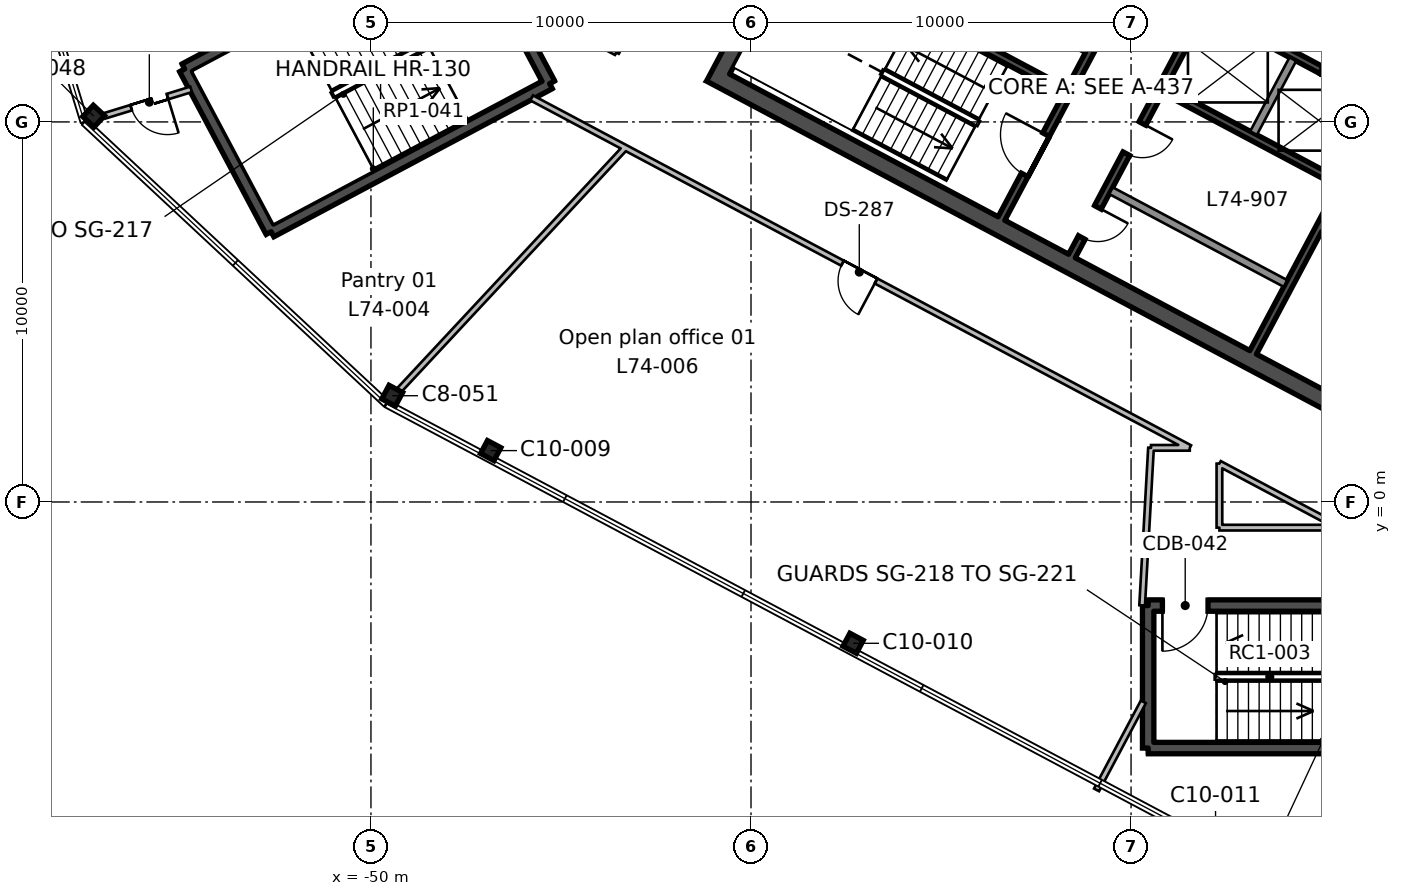
"""IFC4 building model, lengths in metres.
Left out: names, types, materials, properties, quantities, classifications, styles, units other than length and angle.
Written with IfcOpenShell. Run it as: python <this file> out.ifc"""

import sys

from ifc_helpers import new_model, si_unit, direction, frame, frame_2d, origin, origin_2d, place, context, subcontext, project, spatial, rectangle, i_section, extrude, element, fill, save


model = new_model("IFC4")
c1 = context("Model", 3, precision=1e-05, world=origin(), true_north=direction((0.0, 1.0)))
c2 = subcontext(c1, "Body", "Model", "MODEL_VIEW")
j1 = project(units=[si_unit("LENGTHUNIT", "METRE"), si_unit("PLANEANGLEUNIT", "RADIAN")], contexts=[c1])
p1 = place(None, origin())
s1 = spatial("IfcSite", under=j1, at=p1, CompositionType="ELEMENT")
p2 = place(p1, origin())
s2 = spatial("IfcBuilding", under=s1, at=p2, CompositionType="ELEMENT")
p3 = place(p2, frame((0.0, 0.0, 324.3)))
s3 = spatial("IfcBuildingStorey", under=s2, at=p3, CompositionType="ELEMENT", Elevation=324.3)
for number, where, z_axis, x_axis in (
    (1, (-37.313, -3.718, 0.0), (0.0, 0.0, 1.0), (0.883, -0.469, 0.0)),
    (2, (-46.849, 1.352, 0.0), (0.0, 0.0, 1.0), (0.883, -0.469, 0.0)),
):
    element("IfcColumn", number, at=place(p3, frame(where, z_axis=z_axis, x_axis=x_axis)), inside=s3, PredefinedType="COLUMN", context=c2, shape_type="SweptSolid", body=[
        extrude(i_section(OverallWidth=0.399, OverallDepth=0.386, WebThickness=0.021, FlangeThickness=0.033, FilletRadius=0.015, at=origin_2d()), origin(), (0.0, 0.0, 1.0), 3.9),
    ])
for number, where, z_axis, x_axis in (
    (3, (-49.441, 2.796, 0.0), (0.0, 0.0, 1.0), (0.883, -0.469, 0.0)),
    (4, (-57.296, 10.152, 0.0), (0.0, 0.0, 1.0), (0.731, -0.682, 0.0)),
):
    element("IfcColumn", number, at=place(p3, frame(where, z_axis=z_axis, x_axis=x_axis)), inside=s3, PredefinedType="COLUMN", context=c2, shape_type="SweptSolid", body=[
        extrude(i_section(OverallWidth=0.404, OverallDepth=0.406, WebThickness=0.027, FlangeThickness=0.044, FilletRadius=0.015, at=origin_2d()), origin(), (0.0, 0.0, 1.0), 3.9),
    ])
p4 = place(p3, frame((-32.004, 27.833, 0.0), z_axis=(0.0, 0.0, 1.0), x_axis=(-0.469467968382, -0.882949504028, 0.0)))
e5 = element("IfcWall", 5, at=p4, inside=s3, PredefinedType="SHEAR", context=c2, shape_type="SweptSolid", body=[
    extrude(rectangle(XDim=19.1, YDim=0.45, at=frame_2d((9.55, 0.0))), origin(), (0.0, 0.0, 1.0), 3.9),
])
p5 = place(p4, frame((10.15, 0.0, 0.0)))
e6 = element("IfcOpeningElement", 6, at=p5, cuts=e5, PredefinedType="OPENING", context=c2, shape_type="SweptSolid", body=[
    extrude(rectangle(XDim=2.4, YDim=2.4, at=frame_2d((1.2, 1.2))), frame((0.0, 0.235, 0.0), z_axis=(0.0, -1.0, 0.0), x_axis=(1.0, 0.0, 0.0)), (0.0, 0.0, 1.0), 0.47),
])
p6 = place(p3, frame((-22.832, 1.578, 0.0), z_axis=(0.0, 0.0, 1.0), x_axis=(-0.88294509198, 0.469476266226, 0.0)))
e7 = element("IfcWall", 7, at=p6, inside=s3, PredefinedType="SHEAR", context=c2, shape_type="SweptSolid", body=[
    extrude(rectangle(XDim=20.2, YDim=0.45, at=frame_2d((10.1, 0.0))), origin(), (0.0, 0.0, 1.0), 3.9),
])
p7 = place(p3, frame((-23.36, 10.382, 0.0), z_axis=(0.0, 0.0, 1.0), x_axis=(-0.469480409012, -0.88294288918, 0.0)))
e8 = element("IfcWall", 8, at=p7, inside=s3, PredefinedType="SHEAR", context=c2, shape_type="SweptSolid", body=[
    extrude(rectangle(XDim=7.3, YDim=0.2, at=frame_2d((3.65, 0.0))), origin(), (0.0, 0.0, 1.0), 3.9),
])
p8 = place(p3, frame((-25.744, 11.65, 0.0), z_axis=(0.0, 0.0, 1.0), x_axis=(-0.469487830541, -0.882938942948, 0.0)))
e9 = element("IfcWall", 9, at=p8, inside=s3, PredefinedType="SOLIDWALL", context=c2, shape_type="SweptSolid", body=[
    extrude(rectangle(XDim=2.2, YDim=0.2, at=frame_2d((1.1, 0.0))), origin(), (0.0, 0.0, 1.0), 3.9),
])
p9 = place(p3, frame((-28.128, 12.917, 0.0), z_axis=(0.0, 0.0, 1.0), x_axis=(-0.469454336211, -0.882956752176, 0.0)))
e10 = element("IfcWall", 10, at=p9, inside=s3, PredefinedType="SHEAR", context=c2, shape_type="SweptSolid", body=[
    extrude(rectangle(XDim=7.3, YDim=0.2, at=frame_2d((3.65, 0.0))), origin(), (0.0, 0.0, 1.0), 3.9),
])
p10 = place(p9, frame((3.35, 0.0, 0.0)))
e11 = element("IfcOpeningElement", 11, at=p10, cuts=e10, PredefinedType="OPENING", context=c2, shape_type="SweptSolid", body=[
    extrude(rectangle(XDim=0.9, YDim=2.1, at=frame_2d((0.45, 1.05))), frame((0.0, 0.11, 0.0), z_axis=(0.0, -1.0, 0.0), x_axis=(1.0, 0.0, 0.0)), (0.0, 0.0, 1.0), 0.22),
])
p11 = place(p9, frame((5.85, 0.0, 0.0)))
e12 = element("IfcOpeningElement", 12, at=p11, cuts=e10, PredefinedType="OPENING", context=c2, shape_type="SweptSolid", body=[
    extrude(rectangle(XDim=0.9, YDim=2.1, at=frame_2d((0.45, 1.05))), frame((0.0, 0.11, 0.0), z_axis=(0.0, -1.0, 0.0), x_axis=(1.0, 0.0, 0.0)), (0.0, 0.0, 1.0), 0.22),
])
p12 = place(p3, frame((-29.982, 13.903, 0.0), z_axis=(0.0, 0.0, 1.0), x_axis=(-0.469454336211, -0.882956752176, 0.0)))
e13 = element("IfcWall", 13, at=p12, inside=s3, PredefinedType="SHEAR", context=c2, shape_type="SweptSolid", body=[
    extrude(rectangle(XDim=7.3, YDim=0.2, at=frame_2d((3.65, 0.0))), origin(), (0.0, 0.0, 1.0), 3.9),
])
p13 = place(p12, frame((4.8, 0.0, 0.0)))
e14 = element("IfcOpeningElement", 14, at=p13, cuts=e13, PredefinedType="OPENING", context=c2, shape_type="SweptSolid", body=[
    extrude(rectangle(XDim=1.2, YDim=2.1, at=frame_2d((0.6, 1.05))), frame((0.0, 0.11, 0.0), z_axis=(0.0, -1.0, 0.0), x_axis=(1.0, 0.0, 0.0)), (0.0, 0.0, 1.0), 0.22),
])
p14 = place(p3, frame((-19.252, 8.311, 0.0), z_axis=(0.0, 0.0, 1.0), x_axis=(-0.882955722218, 0.469456273365, 0.0)))
e15 = element("IfcWall", 15, at=p14, inside=s3, PredefinedType="SHEAR", context=c2, shape_type="SweptSolid", body=[
    extrude(rectangle(XDim=10.0, YDim=0.2, at=frame_2d((5.0, 0.0))), origin(), (0.0, 0.0, 1.0), 3.9),
])
p15 = place(p14, frame((2.1, 0.0, 0.0)))
e16 = element("IfcOpeningElement", 16, at=p15, cuts=e15, PredefinedType="OPENING", context=c2, shape_type="SweptSolid", body=[
    extrude(rectangle(XDim=1.2, YDim=2.1, at=frame_2d((0.6, 1.05))), frame((0.0, 0.11, 0.0), z_axis=(0.0, -1.0, 0.0), x_axis=(1.0, 0.0, 0.0)), (0.0, 0.0, 1.0), 0.22),
])
p16 = place(p14, frame((5.4, 0.0, 0.0)))
e17 = element("IfcOpeningElement", 17, at=p16, cuts=e15, PredefinedType="OPENING", context=c2, shape_type="SweptSolid", body=[
    extrude(rectangle(XDim=1.1, YDim=2.1, at=frame_2d((0.55, 1.05))), frame((0.0, 0.11, 0.0), z_axis=(0.0, -1.0, 0.0), x_axis=(1.0, 0.0, 0.0)), (0.0, 0.0, 1.0), 0.22),
])
p17 = place(p14, frame((8.1, 0.0, 0.0)))
e18 = element("IfcOpeningElement", 18, at=p17, cuts=e15, PredefinedType="OPENING", context=c2, shape_type="SweptSolid", body=[
    extrude(rectangle(XDim=1.1, YDim=2.1, at=frame_2d((0.55, 1.05))), frame((0.0, 0.11, 0.0), z_axis=(0.0, -1.0, 0.0), x_axis=(1.0, 0.0, 0.0)), (0.0, 0.0, 1.0), 0.22),
])
p18 = place(p3, frame((-24.528, 8.398, 0.0), z_axis=(0.0, 0.0, 1.0), x_axis=(-0.882953967957, 0.469459572775, 0.0)))
e19 = element("IfcWall", 19, at=p18, inside=s3, PredefinedType="SHEAR", context=c2, shape_type="SweptSolid", body=[
    extrude(rectangle(XDim=5.2, YDim=0.2, at=frame_2d((2.6, 0.0))), origin(), (0.0, 0.0, 1.0), 3.9),
])
p19 = place(p3, frame((-31.15, 11.919, 0.0), z_axis=(0.0, 0.0, 1.0), x_axis=(-0.882940221191, 0.469485426614, 0.0)))
e20 = element("IfcWall", 20, at=p19, inside=s3, PredefinedType="SHEAR", context=c2, shape_type="SweptSolid", body=[
    extrude(rectangle(XDim=8.0, YDim=0.2, at=frame_2d((4.0, 0.0))), origin(), (0.0, 0.0, 1.0), 3.9),
])
p20 = place(p3, frame((-20.965, 5.088, 0.0), z_axis=(0.0, 0.0, 1.0), x_axis=(-0.882925986334, 0.469512196493, 0.0)))
e21 = element("IfcWall", 21, at=p20, inside=s3, PredefinedType="SHEAR", context=c2, shape_type="SweptSolid", body=[
    extrude(rectangle(XDim=4.5, YDim=0.2, at=frame_2d((2.25, 0.0))), origin(), (0.0, 0.0, 1.0), 3.9),
])
p21 = place(p20, frame((0.6, 0.0, 0.0)))
e22 = element("IfcOpeningElement", 22, at=p21, cuts=e21, PredefinedType="OPENING", context=c2, shape_type="SweptSolid", body=[
    extrude(rectangle(XDim=1.1, YDim=2.1, at=frame_2d((0.55, 1.05))), frame((0.0, 0.11, 0.0), z_axis=(0.0, -1.0, 0.0), x_axis=(1.0, 0.0, 0.0)), (0.0, 0.0, 1.0), 0.22),
])
p22 = place(p3, frame((-31.737, 10.816, 0.0), z_axis=(0.0, 0.0, 1.0), x_axis=(-0.882940221191, 0.469485426614, 0.0)))
e23 = element("IfcWall", 23, at=p22, inside=s3, PredefinedType="SHEAR", context=c2, shape_type="SweptSolid", body=[
    extrude(rectangle(XDim=8.0, YDim=0.2, at=frame_2d((4.0, 0.0))), origin(), (0.0, 0.0, 1.0), 3.9),
])
p23 = place(p3, frame((-25.937, 5.75, 0.0), z_axis=(0.0, 0.0, 1.0), x_axis=(-0.882934506056, 0.469496174655, 0.0)))
e24 = element("IfcWall", 24, at=p23, inside=s3, PredefinedType="SOLIDWALL", context=c2, shape_type="SweptSolid", body=[
    extrude(rectangle(XDim=5.2, YDim=0.2, at=frame_2d((2.6, 0.0))), origin(), (0.0, 0.0, 1.0), 3.9),
])
p24 = place(p3, frame((-47.574, 15.29, 0.0), z_axis=(0.0, 0.0, 1.0), x_axis=(0.469443498566, -0.882962514297, 0.0)))
e25 = element("IfcWall", 25, at=p24, inside=s3, PredefinedType="SHEAR", context=c2, shape_type="SweptSolid", body=[
    extrude(rectangle(XDim=4.85, YDim=0.3, at=frame_2d((2.425, 0.0))), origin(), (0.0, 0.0, 1.0), 3.9),
])
p25 = place(p3, frame((-45.297, 11.007, 0.0), z_axis=(0.0, 0.0, 1.0), x_axis=(-0.882951519127, -0.469464178475, 0.0)))
e26 = element("IfcWall", 26, at=p25, inside=s3, PredefinedType="SHEAR", context=c2, shape_type="SweptSolid", body=[
    extrude(rectangle(XDim=8.3, YDim=0.3, at=frame_2d((4.15, 0.0))), origin(), (0.0, 0.0, 1.0), 3.9),
])
p26 = place(p3, frame((-52.626, 7.111, 0.0), z_axis=(0.0, 0.0, 1.0), x_axis=(-0.469464364128, 0.882951420416, 0.0)))
e27 = element("IfcWall", 27, at=p26, inside=s3, PredefinedType="SHEAR", context=c2, shape_type="SweptSolid", body=[
    extrude(rectangle(XDim=4.85, YDim=0.3, at=frame_2d((2.425, 0.0))), origin(), (0.0, 0.0, 1.0), 3.9),
])
p27 = place(p3, frame((-54.903, 11.393, 0.0), z_axis=(0.0, 0.0, 1.0), x_axis=(0.882939326045, 0.469487110071, 0.0)))
e28 = element("IfcWall", 28, at=p27, inside=s3, PredefinedType="SHEAR", context=c2, shape_type="SweptSolid", body=[
    extrude(rectangle(XDim=8.3, YDim=0.3, at=frame_2d((4.15, 0.0))), origin(), (0.0, 0.0, 1.0), 3.9),
])
p28 = place(p27, frame((6.05, 0.0, 0.0)))
e29 = element("IfcOpeningElement", 29, at=p28, cuts=e28, PredefinedType="OPENING", context=c2, shape_type="SweptSolid", body=[
    extrude(rectangle(XDim=1.9, YDim=2.1, at=frame_2d((0.95, 1.05))), frame((0.0, 0.16, 0.0), z_axis=(0.0, -1.0, 0.0), x_axis=(1.0, 0.0, 0.0)), (0.0, 0.0, 1.0), 0.32),
])
p29 = place(p3, frame((-21.25, -6.475, 0.0), z_axis=(0.0, 0.0, 1.0), x_axis=(-1.0, 0.0, 0.0)))
e30 = element("IfcWall", 30, at=p29, inside=s3, PredefinedType="SHEAR", context=c2, shape_type="SweptSolid", body=[
    extrude(rectangle(XDim=8.3, YDim=0.3, at=frame_2d((4.15, 0.0))), origin(), (0.0, 0.0, 1.0), 3.9),
])
p30 = place(p3, frame((-29.55, -6.475, 0.0), z_axis=(0.0, 0.0, 1.0), x_axis=(0.0, 1.0, 0.0)))
e31 = element("IfcWall", 31, at=p30, inside=s3, PredefinedType="SHEAR", context=c2, shape_type="SweptSolid", body=[
    extrude(rectangle(XDim=3.75, YDim=0.3, at=frame_2d((1.875, 0.0))), origin(), (0.0, 0.0, 1.0), 3.9),
])
p31 = place(p3, frame((-29.55, -2.725, 0.0), z_axis=(0.0, 0.0, 1.0), x_axis=(1.0, 0.0, 0.0)))
e32 = element("IfcWall", 32, at=p31, inside=s3, PredefinedType="SHEAR", context=c2, shape_type="SweptSolid", body=[
    extrude(rectangle(XDim=8.3, YDim=0.3, at=frame_2d((4.15, 0.0))), origin(), (0.0, 0.0, 1.0), 3.9),
])
p32 = place(p31, frame((0.375, 0.0, 0.0)))
e33 = element("IfcOpeningElement", 33, at=p32, cuts=e32, PredefinedType="OPENING", context=c2, shape_type="SweptSolid", body=[
    extrude(rectangle(XDim=1.2, YDim=2.1, at=frame_2d((0.6, 1.05))), frame((0.0, 0.16, 0.0), z_axis=(0.0, -1.0, 0.0), x_axis=(1.0, 0.0, 0.0)), (0.0, 0.0, 1.0), 0.32),
])
p33 = place(p3, frame((-54.732, 10.857, 0.0), z_axis=(0.0, 0.0, 1.0), x_axis=(-0.956231519395, -0.292611143525, 0.0)))
e34 = element("IfcWall", 34, at=p33, inside=s3, PredefinedType="PARTITIONING", context=c2, shape_type="SweptSolid", body=[
    extrude(rectangle(XDim=2.385, YDim=0.15, at=frame_2d((1.193, 0.0))), origin(), (0.0, 0.0, 1.0), 3.5),
])
p34 = place(p33, frame((0.65, 0.0, 0.0)))
e35 = element("IfcOpeningElement", 35, at=p34, cuts=e34, PredefinedType="OPENING", context=c2, shape_type="SweptSolid", body=[
    extrude(rectangle(XDim=1.0, YDim=2.1, at=frame_2d((0.5, 1.05))), frame((0.0, 0.085, 0.0), z_axis=(0.0, -1.0, 0.0), x_axis=(1.0, 0.0, 0.0)), (0.0, 0.0, 1.0), 0.17),
])
p35 = place(p3, frame((-43.308, 9.323, 0.0), z_axis=(0.0, 0.0, 1.0), x_axis=(-0.681957743037, -0.7313915755, 0.0)))
e36 = element("IfcWall", 36, at=p35, inside=s3, PredefinedType="PARTITIONING", context=c2, shape_type="SweptSolid", body=[
    extrude(rectangle(XDim=8.737, YDim=0.15, at=frame_2d((4.368, 0.0))), origin(), (0.0, 0.0, 1.0), 3.5),
])
p36 = place(p3, frame((-34.155, 29.486, 0.0), z_axis=(0.0, 0.0, 1.0), x_axis=(-0.469446756585, -0.882960782103, 0.0)))
e37 = element("IfcWall", 37, at=p36, inside=s3, PredefinedType="PARTITIONING", context=c2, shape_type="SweptSolid", body=[
    extrude(rectangle(XDim=20.0, YDim=0.15, at=frame_2d((10.0, 0.0))), origin(), (0.0, 0.0, 1.0), 3.5),
])
p37 = place(p3, frame((-43.544, 11.827, 0.0), z_axis=(0.0, 0.0, 1.0), x_axis=(-0.882974130461, 0.469421649411, 0.0)))
e38 = element("IfcWall", 38, at=p37, inside=s3, PredefinedType="PARTITIONING", context=c2, shape_type="SweptSolid", body=[
    extrude(rectangle(XDim=3.238, YDim=0.15, at=frame_2d((1.619, 0.0))), origin(), (0.0, 0.0, 1.0), 3.5),
])
p38 = place(p3, frame((-28.454, 1.425, 0.0), z_axis=(0.0, 0.0, 1.0), x_axis=(-0.882958686675, 0.469450697757, 0.0)))
e39 = element("IfcWall", 39, at=p38, inside=s3, PredefinedType="PARTITIONING", context=c2, shape_type="SweptSolid", body=[
    extrude(rectangle(XDim=19.612, YDim=0.15, at=frame_2d((9.806, 0.0))), origin(), (0.0, 0.0, 1.0), 3.5),
])
p39 = place(p38, frame((9.35, 0.0, 0.0)))
e40 = element("IfcOpeningElement", 40, at=p39, cuts=e39, PredefinedType="OPENING", context=c2, shape_type="SweptSolid", body=[
    extrude(rectangle(XDim=1.0, YDim=2.1, at=frame_2d((0.5, 1.05))), frame((0.0, 0.085, 0.0), z_axis=(0.0, -1.0, 0.0), x_axis=(1.0, 0.0, 0.0)), (0.0, 0.0, 1.0), 0.17),
])
p40 = place(p3, frame((-29.677, -5.259, 0.0), z_axis=(0.0, 0.0, 1.0), x_axis=(-0.469186976584, -0.883098851207, 0.0)))
e41 = element("IfcWall", 41, at=p40, inside=s3, PredefinedType="PARTITIONING", context=c2, shape_type="SweptSolid", body=[
    extrude(rectangle(XDim=2.624, YDim=0.15, at=frame_2d((1.312, 0.0))), origin(), (0.0, 0.0, 1.0), 3.5),
])
p41 = place(p3, frame((-29.708, -2.721, 0.0), z_axis=(0.0, 0.0, 1.0), x_axis=(0.056209208886, 0.998419012658, 0.0)))
e42 = element("IfcWall", 42, at=p41, inside=s3, PredefinedType="PARTITIONING", context=c2, shape_type="SweptSolid", body=[
    extrude(rectangle(XDim=4.152, YDim=0.15, at=frame_2d((2.076, 0.0))), origin(), (0.0, 0.0, 1.0), 3.5),
])
p42 = place(p3, frame((-28.455, 1.425, 0.0), z_axis=(0.0, 0.0, 1.0), x_axis=(-0.999999541697, -0.000957395444, 0.0)))
e43 = element("IfcWall", 43, at=p42, inside=s3, PredefinedType="PARTITIONING", context=c2, shape_type="SweptSolid", body=[
    extrude(rectangle(XDim=1.02, YDim=0.15, at=frame_2d((0.51, 0.0))), origin(), (0.0, 0.0, 1.0), 3.5),
])
p43 = place(p3, frame((-27.675, 1.011, 0.0), z_axis=(0.0, 0.0, 1.0), x_axis=(0.0, -1.0, 0.0)))
e44 = element("IfcWall", 44, at=p43, inside=s3, PredefinedType="PARTITIONING", context=c2, shape_type="SweptSolid", body=[
    extrude(rectangle(XDim=1.686, YDim=0.15, at=frame_2d((0.843, 0.0))), origin(), (0.0, 0.0, 1.0), 3.5),
])
p44 = place(p3, frame((-27.675, -0.675, 0.0), z_axis=(0.0, 0.0, 1.0), x_axis=(1.0, 0.0, 0.0)))
e45 = element("IfcWall", 45, at=p44, inside=s3, PredefinedType="PARTITIONING", context=c2, shape_type="SweptSolid", body=[
    extrude(rectangle(XDim=3.171, YDim=0.15, at=frame_2d((1.585, 0.0))), origin(), (0.0, 0.0, 1.0), 3.5),
])
p45 = place(p3, frame((-24.504, -0.675, 0.0), z_axis=(0.0, 0.0, 1.0), x_axis=(-0.882958125757, 0.46945175275, 0.0)))
e46 = element("IfcWall", 46, at=p45, inside=s3, PredefinedType="PARTITIONING", context=c2, shape_type="SweptSolid", body=[
    extrude(rectangle(XDim=3.592, YDim=0.15, at=frame_2d((1.796, 0.0))), origin(), (0.0, 0.0, 1.0), 3.5),
])
p46 = place(p13, frame((1.2, 0.0, 0.0), z_axis=(0.0, 0.0, 1.0), x_axis=(-1.0, 0.0, 0.0)))
e47 = element("IfcDoor", 47, at=p46, inside=s3, OperationType="SINGLE_SWING_RIGHT", PredefinedType="DOOR", context=c2, shape_type="SweptSolid", body=[
    extrude(rectangle(XDim=1.2, YDim=2.1, at=frame_2d((0.6, 1.05))), frame((0.0, 0.025, 0.0), z_axis=(0.0, -1.0, 0.0), x_axis=(1.0, 0.0, 0.0)), (0.0, 0.0, 1.0), 0.05),
])
fill(e14, e47)
p47 = place(p16, origin())
e48 = element("IfcDoor", 48, at=p47, inside=s3, OperationType="DOUBLE_DOOR_SLIDING", PredefinedType="DOOR", context=c2, shape_type="SweptSolid", body=[
    extrude(rectangle(XDim=1.1, YDim=2.1, at=frame_2d((0.55, 1.05))), frame((0.0, 0.025, 0.0), z_axis=(0.0, -1.0, 0.0), x_axis=(1.0, 0.0, 0.0)), (0.0, 0.0, 1.0), 0.05),
])
fill(e17, e48)
p48 = place(p10, origin())
e49 = element("IfcDoor", 49, at=p48, inside=s3, OperationType="SINGLE_SWING_LEFT", PredefinedType="DOOR", context=c2, shape_type="SweptSolid", body=[
    extrude(rectangle(XDim=0.9, YDim=2.1, at=frame_2d((0.45, 1.05))), frame((0.0, 0.025, 0.0), z_axis=(0.0, -1.0, 0.0), x_axis=(1.0, 0.0, 0.0)), (0.0, 0.0, 1.0), 0.05),
])
fill(e11, e49)
p49 = place(p11, origin())
e50 = element("IfcDoor", 50, at=p49, inside=s3, OperationType="SINGLE_SWING_LEFT", PredefinedType="DOOR", context=c2, shape_type="SweptSolid", body=[
    extrude(rectangle(XDim=0.9, YDim=2.1, at=frame_2d((0.45, 1.05))), frame((0.0, 0.025, 0.0), z_axis=(0.0, -1.0, 0.0), x_axis=(1.0, 0.0, 0.0)), (0.0, 0.0, 1.0), 0.05),
])
fill(e12, e50)
p50 = place(p32, frame((1.2, 0.0, 0.0), z_axis=(0.0, 0.0, 1.0), x_axis=(-1.0, 0.0, 0.0)))
e51 = element("IfcDoor", 51, at=p50, inside=s3, OperationType="SINGLE_SWING_RIGHT", PredefinedType="DOOR", context=c2, shape_type="SweptSolid", body=[
    extrude(rectangle(XDim=1.2, YDim=2.1, at=frame_2d((0.6, 1.05))), frame((0.0, 0.025, 0.0), z_axis=(0.0, -1.0, 0.0), x_axis=(1.0, 0.0, 0.0)), (0.0, 0.0, 1.0), 0.05),
])
fill(e33, e51)
p51 = place(p34, origin())
e52 = element("IfcDoor", 52, at=p51, inside=s3, OperationType="SINGLE_SWING_LEFT", PredefinedType="DOOR", context=c2, shape_type="SweptSolid", body=[
    extrude(rectangle(XDim=1.0, YDim=2.1, at=frame_2d((0.5, 1.05))), frame((0.0, 0.025, 0.0), z_axis=(0.0, -1.0, 0.0), x_axis=(1.0, 0.0, 0.0)), (0.0, 0.0, 1.0), 0.05),
])
fill(e35, e52)
p52 = place(p39, origin())
e53 = element("IfcDoor", 53, at=p52, inside=s3, OperationType="SINGLE_SWING_LEFT", PredefinedType="DOOR", context=c2, shape_type="SweptSolid", body=[
    extrude(rectangle(XDim=1.0, YDim=2.1, at=frame_2d((0.5, 1.05))), frame((0.0, 0.025, 0.0), z_axis=(0.0, -1.0, 0.0), x_axis=(1.0, 0.0, 0.0)), (0.0, 0.0, 1.0), 0.05),
])
fill(e40, e53)
save(model, sys.argv[1])
